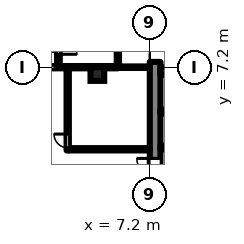
"""IFC4 building model, lengths in metres.
Left out: names, types, materials, properties, quantities, classifications, styles, units other than length and angle.
Written with IfcOpenShell. Run it as: python <this file> out.ifc"""

import sys

from ifc_helpers import new_model, si_unit, direction, frame, frame_2d, origin, origin_2d, place, context, subcontext, project, spatial, rectangle, extrude, element, fill, save


model = new_model("IFC4")
c1 = context("Model", 3, precision=1e-05, world=origin(), true_north=direction((0.0, 1.0)))
c2 = subcontext(c1, "Body", "Model", "MODEL_VIEW")
j1 = project(units=[si_unit("LENGTHUNIT", "METRE"), si_unit("PLANEANGLEUNIT", "RADIAN")], contexts=[c1])
p1 = place(None, origin())
s1 = spatial("IfcSite", under=j1, at=p1, CompositionType="ELEMENT")
p2 = place(p1, origin())
s2 = spatial("IfcBuilding", under=s1, at=p2, CompositionType="ELEMENT")
p3 = place(p2, origin())
s3 = spatial("IfcBuildingStorey", under=s2, at=p3, CompositionType="ELEMENT", Elevation=0.0)
p4 = place(p3, frame((3.75, 6.75, 0.0), z_axis=(0.0, 0.0, 1.0), x_axis=(1.0, 0.0, 0.0)))
e1 = element("IfcColumn", 1, at=p4, inside=s3, PredefinedType="COLUMN", context=c2, shape_type="SweptSolid", body=[
    extrude(rectangle(XDim=0.9, YDim=0.9, at=origin_2d()), origin(), (0.0, 0.0, 1.0), 7.2),
])
p5 = place(p3, frame((7.55, -7.548, 0.0), z_axis=(0.0, 0.0, 1.0), x_axis=(0.0, 1.0, 0.0)))
e2 = element("IfcWall", 2, at=p5, inside=s3, PredefinedType="SHEAR", context=c2, shape_type="SweptSolid", body=[
    extrude(rectangle(XDim=15.096, YDim=0.7, at=frame_2d((7.548, 0.0))), origin(), (0.0, 0.0, 1.0), 6.6),
])
p6 = place(p5, frame((6.348, 0.0, 0.0)))
e3 = element("IfcOpeningElement", 3, at=p6, cuts=e2, PredefinedType="OPENING", context=c2, shape_type="SweptSolid", body=[
    extrude(rectangle(XDim=2.4, YDim=2.2, at=frame_2d((1.2, 1.1))), frame((0.0, 0.36, 0.0), z_axis=(0.0, -1.0, 0.0), x_axis=(1.0, 0.0, 0.0)), (0.0, 0.0, 1.0), 0.72),
])
p7 = place(p3, frame((7.9, 6.95, 0.0), z_axis=(0.0, 0.0, 1.0), x_axis=(1.0, 0.0, 0.0)))
e4 = element("IfcWall", 4, at=p7, inside=s3, PredefinedType="SHEAR", context=c2, shape_type="SweptSolid", body=[
    extrude(rectangle(XDim=12.95, YDim=0.5, at=frame_2d((6.475, 0.0))), origin(), (0.0, 0.0, 1.0), 6.6),
])
p8 = place(p7, frame((5.35, 0.0, 0.0)))
e5 = element("IfcOpeningElement", 5, at=p8, cuts=e4, PredefinedType="OPENING", context=c2, shape_type="SweptSolid", body=[
    extrude(rectangle(XDim=1.1, YDim=2.1, at=frame_2d((0.55, 1.05))), frame((0.0, 0.26, 0.0), z_axis=(0.0, -1.0, 0.0), x_axis=(1.0, 0.0, 0.0)), (0.0, 0.0, 1.0), 0.52),
])
p9 = place(p3, frame((7.9, 1.925, 0.0), z_axis=(0.0, 0.0, 1.0), x_axis=(1.0, 0.0, 0.0)))
e6 = element("IfcWall", 6, at=p9, inside=s3, PredefinedType="SHEAR", context=c2, shape_type="SweptSolid", body=[
    extrude(rectangle(XDim=12.95, YDim=0.25, at=frame_2d((6.475, 0.0))), origin(), (0.0, 0.0, 1.0), 6.6),
])
p10 = place(p9, frame((11.425, 0.0, 0.0)))
e7 = element("IfcOpeningElement", 7, at=p10, cuts=e6, PredefinedType="OPENING", context=c2, shape_type="SweptSolid", body=[
    extrude(rectangle(XDim=1.1, YDim=2.1, at=frame_2d((0.55, 1.05))), frame((0.0, 0.135, 0.0), z_axis=(0.0, -1.0, 0.0), x_axis=(1.0, 0.0, 0.0)), (0.0, 0.0, 1.0), 0.27),
])
p11 = place(p9, frame((0.525, 0.0, 0.0)))
e8 = element("IfcOpeningElement", 8, at=p11, cuts=e6, PredefinedType="OPENING", context=c2, shape_type="SweptSolid", body=[
    extrude(rectangle(XDim=0.9, YDim=2.1, at=frame_2d((0.45, 1.05))), frame((0.0, 0.135, 0.0), z_axis=(0.0, -1.0, 0.0), x_axis=(1.0, 0.0, 0.0)), (0.0, 0.0, 1.0), 0.27),
])
p12 = place(p9, frame((2.625, 0.0, 0.0)))
e9 = element("IfcOpeningElement", 9, at=p12, cuts=e6, PredefinedType="OPENING", context=c2, shape_type="SweptSolid", body=[
    extrude(rectangle(XDim=1.1, YDim=2.1, at=frame_2d((0.55, 1.05))), frame((0.0, 0.135, 0.0), z_axis=(0.0, -1.0, 0.0), x_axis=(1.0, 0.0, 0.0)), (0.0, 0.0, 1.0), 0.27),
])
p13 = place(p9, frame((7.125, 0.0, 0.0)))
e10 = element("IfcOpeningElement", 10, at=p13, cuts=e6, PredefinedType="OPENING", context=c2, shape_type="SweptSolid", body=[
    extrude(rectangle(XDim=0.9, YDim=2.1, at=frame_2d((0.45, 1.05))), frame((0.0, 0.135, 0.0), z_axis=(0.0, -1.0, 0.0), x_axis=(1.0, 0.0, 0.0)), (0.0, 0.0, 1.0), 0.27),
])
p14 = place(p3, frame((7.9, 4.275, 0.0), z_axis=(0.0, 0.0, 1.0), x_axis=(1.0, 0.0, 0.0)))
e11 = element("IfcWall", 11, at=p14, inside=s3, PredefinedType="SHEAR", context=c2, shape_type="SweptSolid", body=[
    extrude(rectangle(XDim=1.95, YDim=0.25, at=frame_2d((0.975, 0.0))), origin(), (0.0, 0.0, 1.0), 6.6),
])
p15 = place(p3, frame((-1.8, 7.2, 0.0), z_axis=(0.0, 0.0, 1.0), x_axis=(1.0, 0.0, 0.0)))
e12 = element("IfcWall", 12, at=p15, inside=s3, PredefinedType="PARTITIONING", context=c2, shape_type="SweptSolid", body=[
    extrude(rectangle(XDim=6.9, YDim=0.15, at=frame_2d((3.45, 0.0))), origin(), (0.0, 0.0, 1.0), 6.6),
])
p16 = place(p15, frame((0.8, 0.0, 0.0)))
e13 = element("IfcOpeningElement", 13, at=p16, cuts=e12, PredefinedType="OPENING", context=c2, shape_type="SweptSolid", body=[
    extrude(rectangle(XDim=2.0, YDim=2.1, at=frame_2d((1.0, 1.05))), frame((0.0, 0.085, 0.0), z_axis=(0.0, -1.0, 0.0), x_axis=(1.0, 0.0, 0.0)), (0.0, 0.0, 1.0), 0.17),
])
p17 = place(p3, frame((1.2, 7.275, 0.0), z_axis=(0.0, 0.0, 1.0), x_axis=(0.0, 1.0, 0.0)))
e14 = element("IfcWall", 14, at=p17, inside=s3, PredefinedType="PARTITIONING", context=c2, shape_type="SweptSolid", body=[
    extrude(rectangle(XDim=9.6, YDim=0.15, at=frame_2d((4.8, 0.0))), origin(), (0.0, 0.0, 1.0), 6.6),
])
p18 = place(p17, frame((0.775, 0.0, 0.0)))
e15 = element("IfcOpeningElement", 15, at=p18, cuts=e14, PredefinedType="OPENING", context=c2, shape_type="SweptSolid", body=[
    extrude(rectangle(XDim=1.2, YDim=2.1, at=frame_2d((0.6, 1.05))), frame((0.0, 0.085, 0.0), z_axis=(0.0, -1.0, 0.0), x_axis=(1.0, 0.0, 0.0)), (0.0, 0.0, 1.0), 0.17),
])
p19 = place(p3, frame((1.8, 1.725, 0.0), z_axis=(0.0, 0.0, 1.0), x_axis=(0.0, 1.0, 0.0)))
e16 = element("IfcWall", 16, at=p19, inside=s3, PredefinedType="PARTITIONING", context=c2, shape_type="SweptSolid", body=[
    extrude(rectangle(XDim=5.4, YDim=0.15, at=frame_2d((2.7, 0.0))), origin(), (0.0, 0.0, 1.0), 6.6),
])
p20 = place(p19, frame((0.175, 0.0, 0.0)))
e17 = element("IfcOpeningElement", 17, at=p20, cuts=e16, PredefinedType="OPENING", context=c2, shape_type="SweptSolid", body=[
    extrude(rectangle(XDim=0.9, YDim=2.1, at=frame_2d((0.45, 1.05))), frame((0.0, 0.085, 0.0), z_axis=(0.0, -1.0, 0.0), x_axis=(1.0, 0.0, 0.0)), (0.0, 0.0, 1.0), 0.17),
])
p21 = place(p3, frame((1.875, 1.8, 0.0), z_axis=(0.0, 0.0, 1.0), x_axis=(1.0, 0.0, 0.0)))
e18 = element("IfcWall", 18, at=p21, inside=s3, PredefinedType="PARTITIONING", context=c2, shape_type="SweptSolid", body=[
    extrude(rectangle(XDim=5.325, YDim=0.15, at=frame_2d((2.663, 0.0))), origin(), (0.0, 0.0, 1.0), 6.6),
])
p22 = place(p3, frame((5.1, 7.275, 0.0), z_axis=(0.0, 0.0, 1.0), x_axis=(0.0, 1.0, 0.0)))
e19 = element("IfcWall", 19, at=p22, inside=s3, PredefinedType="PARTITIONING", context=c2, shape_type="SweptSolid", body=[
    extrude(rectangle(XDim=9.45, YDim=0.15, at=frame_2d((4.725, 0.0))), origin(), (0.0, 0.0, 1.0), 6.6),
])
p23 = place(p3, frame((5.1, 7.2, 0.0), z_axis=(0.0, 0.0, 1.0), x_axis=(1.0, 0.0, 0.0)))
e20 = element("IfcWall", 20, at=p23, inside=s3, PredefinedType="PARTITIONING", context=c2, shape_type="SweptSolid", body=[
    extrude(rectangle(XDim=2.1, YDim=0.1, at=frame_2d((1.05, 0.0))), origin(), (0.0, 0.0, 1.0), 6.6),
])
p24 = place(p6, origin())
e21 = element("IfcDoor", 21, at=p24, inside=s3, OperationType="DOUBLE_DOOR_DOUBLE_SWING", PredefinedType="DOOR", context=c2, shape_type="SweptSolid", body=[
    extrude(rectangle(XDim=2.4, YDim=2.2, at=frame_2d((1.2, 1.1))), frame((0.0, 0.025, 0.0), z_axis=(0.0, -1.0, 0.0), x_axis=(1.0, 0.0, 0.0)), (0.0, 0.0, 1.0), 0.05),
])
fill(e3, e21)
p25 = place(p16, origin())
e22 = element("IfcDoor", 22, at=p25, inside=s3, OperationType="DOUBLE_DOOR_DOUBLE_SWING", PredefinedType="DOOR", context=c2, shape_type="SweptSolid", body=[
    extrude(rectangle(XDim=2.0, YDim=2.1, at=frame_2d((1.0, 1.05))), frame((0.0, 0.025, 0.0), z_axis=(0.0, -1.0, 0.0), x_axis=(1.0, 0.0, 0.0)), (0.0, 0.0, 1.0), 0.05),
])
fill(e13, e22)
p26 = place(p20, origin())
e23 = element("IfcDoor", 23, at=p26, inside=s3, OperationType="SINGLE_SWING_RIGHT", PredefinedType="DOOR", context=c2, shape_type="SweptSolid", body=[
    extrude(rectangle(XDim=0.9, YDim=2.1, at=frame_2d((0.45, 1.05))), frame((0.0, 0.025, 0.0), z_axis=(0.0, -1.0, 0.0), x_axis=(1.0, 0.0, 0.0)), (0.0, 0.0, 1.0), 0.05),
])
fill(e17, e23)
p27 = place(p18, frame((1.2, 0.0, 0.0), z_axis=(0.0, 0.0, 1.0), x_axis=(-1.0, 0.0, 0.0)))
e24 = element("IfcDoor", 24, at=p27, inside=s3, OperationType="SINGLE_SWING_RIGHT", PredefinedType="DOOR", context=c2, shape_type="SweptSolid", body=[
    extrude(rectangle(XDim=1.2, YDim=2.1, at=frame_2d((0.6, 1.05))), frame((0.0, 0.025, 0.0), z_axis=(0.0, -1.0, 0.0), x_axis=(1.0, 0.0, 0.0)), (0.0, 0.0, 1.0), 0.05),
])
fill(e15, e24)
save(model, sys.argv[1])
